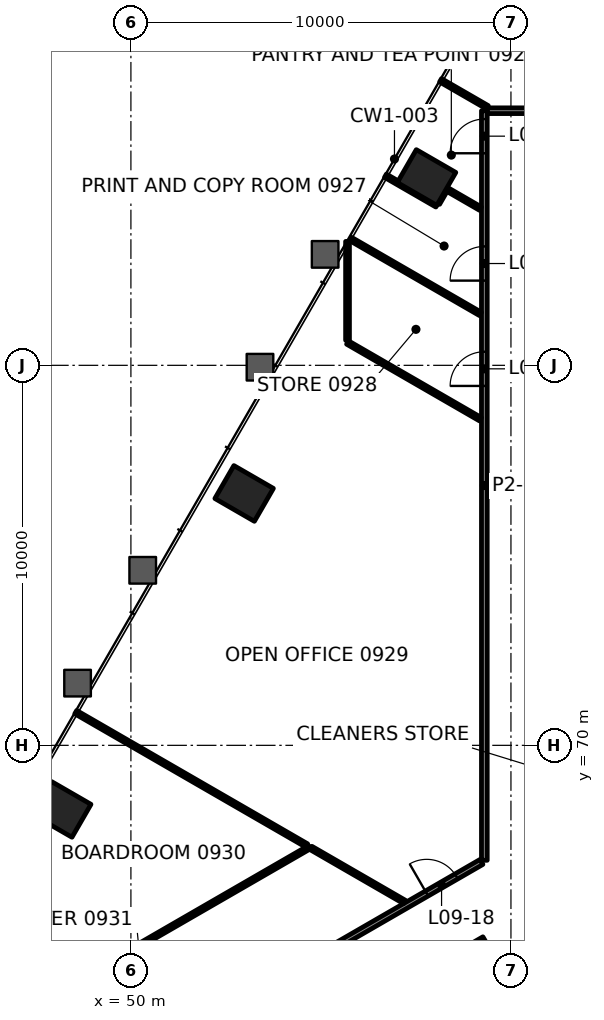
"""IFC4 building model, lengths in metres.
Left out: names, types, materials, properties, quantities, classifications, styles, units other than length and angle.
Written with IfcOpenShell. Run it as: python <this file> out.ifc"""

import sys

from ifc_helpers import new_model, si_unit, direction, frame, frame_2d, origin, origin_2d, place, context, subcontext, project, spatial, rectangle, extrude, element, fill, save


model = new_model("IFC4")
c1 = context("Model", 3, precision=1e-05, world=origin(), true_north=direction((0.0, 1.0)))
c2 = subcontext(c1, "Body", "Model", "MODEL_VIEW")
j1 = project(units=[si_unit("LENGTHUNIT", "METRE"), si_unit("PLANEANGLEUNIT", "RADIAN")], contexts=[c1])
p1 = place(None, origin())
s1 = spatial("IfcSite", under=j1, at=p1, CompositionType="ELEMENT")
p2 = place(p1, origin())
s2 = spatial("IfcBuilding", under=s1, at=p2, CompositionType="ELEMENT")
p3 = place(p2, frame((0.0, 0.0, 44.2)))
s3 = spatial("IfcBuildingStorey", under=s2, at=p3, CompositionType="ELEMENT", Elevation=44.2)
for number, where, z_axis, x_axis in (
    (1, (57.78, 84.942, -0.0), (0.0, 0.0, 1.0), (-0.5, -0.866, 0.0)),
    (2, (52.979, 76.628, -0.0), (0.0, 0.0, 1.0), (-0.5, -0.866, 0.0)),
    (3, (48.179, 68.315, -0.0), (0.0, 0.0, 1.0), (-0.5, -0.866, 0.0)),
):
    element("IfcColumn", number, at=place(p3, frame(where, z_axis=z_axis, x_axis=x_axis)), inside=s3, PredefinedType="COLUMN", context=c2, shape_type="SweptSolid", body=[
        extrude(rectangle(XDim=1.0, YDim=1.2, at=origin_2d()), origin(), (0.0, 0.0, 1.0), 4.2),
    ])
p4 = place(p3, frame((59.375, 86.7, 0.0), z_axis=(0.0, 0.0, 1.0), x_axis=(1.0, 0.0, 0.0)))
e4 = element("IfcWall", 4, at=p4, inside=s3, PredefinedType="PARTITIONING", context=c2, shape_type="SweptSolid", body=[
    extrude(rectangle(XDim=9.649, YDim=0.15, at=frame_2d((4.825, 0.0))), origin(), (0.0, 0.0, 1.0), 3.4),
])
p5 = place(p4, frame((4.375, 0.0, 0.0)))
e5 = element("IfcOpeningElement", 5, at=p5, cuts=e4, PredefinedType="OPENING", context=c2, shape_type="SweptSolid", body=[
    extrude(rectangle(XDim=0.9, YDim=2.1, at=frame_2d((0.45, 1.05))), frame((0.0, 0.085, 0.0), z_axis=(0.0, -1.0, 0.0), x_axis=(1.0, 0.0, 0.0)), (0.0, 0.0, 1.0), 0.17),
])
p6 = place(p3, frame((59.3, 64.896, 0.0), z_axis=(0.0, 0.0, 1.0), x_axis=(-0.866022774611, -0.500004553834, 0.0)))
e6 = element("IfcWall", 6, at=p6, inside=s3, PredefinedType="PARTITIONING", context=c2, shape_type="SweptSolid", body=[
    extrude(rectangle(XDim=13.185, YDim=0.15, at=frame_2d((6.593, 0.0))), origin(), (0.0, 0.0, 1.0), 3.247),
])
p7 = place(p6, frame((6.676, 0.0, 0.0)))
e7 = element("IfcOpeningElement", 7, at=p7, cuts=e6, PredefinedType="OPENING", context=c2, shape_type="SweptSolid", body=[
    extrude(rectangle(XDim=0.9, YDim=2.1, at=frame_2d((0.45, 1.05))), frame((0.0, 0.085, 0.0), z_axis=(0.0, -1.0, 0.0), x_axis=(1.0, 0.0, 0.0)), (0.0, 0.0, 1.0), 0.17),
])
p8 = place(p3, frame((46.981, 59.863, 0.0), z_axis=(0.0, 0.0, 1.0), x_axis=(0.866023110832, 0.500003971489, 0.0)))
e8 = element("IfcWall", 8, at=p8, inside=s3, PredefinedType="PARTITIONING", context=c2, shape_type="SweptSolid", body=[
    extrude(rectangle(XDim=14.138, YDim=0.15, at=frame_2d((7.069, 0.0))), origin(), (0.0, 0.0, 1.0), 3.4),
])
p9 = place(p8, frame((5.559, 0.0, 0.0)))
e9 = element("IfcOpeningElement", 9, at=p9, cuts=e8, PredefinedType="OPENING", context=c2, shape_type="SweptSolid", body=[
    extrude(rectangle(XDim=1.0, YDim=2.1, at=frame_2d((0.5, 1.05))), frame((0.0, 0.085, 0.0), z_axis=(0.0, -1.0, 0.0), x_axis=(1.0, 0.0, 0.0)), (0.0, 0.0, 1.0), 0.17),
])
p10 = place(p8, frame((12.475, 0.0, 0.0)))
e10 = element("IfcOpeningElement", 10, at=p10, cuts=e8, PredefinedType="OPENING", context=c2, shape_type="SweptSolid", body=[
    extrude(rectangle(XDim=0.9, YDim=2.1, at=frame_2d((0.45, 1.05))), frame((0.0, 0.085, 0.0), z_axis=(0.0, -1.0, 0.0), x_axis=(1.0, 0.0, 0.0)), (0.0, 0.0, 1.0), 0.17),
])
p11 = place(p3, frame((54.7, 67.321, 0.0), z_axis=(0.0, 0.0, 1.0), x_axis=(-0.866023761488, -0.500002844531, 0.0)))
e11 = element("IfcWall", 11, at=p11, inside=s3, PredefinedType="PARTITIONING", context=c2, shape_type="SweptSolid", body=[
    extrude(rectangle(XDim=13.014, YDim=0.1, at=frame_2d((6.507, 0.0))), origin(), (0.0, 0.0, 1.0), 3.4),
])
p12 = place(p11, frame((5.907, 0.0, 0.0)))
e12 = element("IfcOpeningElement", 12, at=p12, cuts=e11, PredefinedType="OPENING", context=c2, shape_type="SweptSolid", body=[
    extrude(rectangle(XDim=1.2, YDim=2.1, at=frame_2d((0.6, 1.05))), frame((0.0, 0.06, 0.0), z_axis=(0.0, -1.0, 0.0), x_axis=(1.0, 0.0, 0.0)), (0.0, 0.0, 1.0), 0.12),
])
p13 = place(p3, frame((58.079, 84.261, 0.0), z_axis=(0.0, 0.0, 1.0), x_axis=(0.499776670437, 0.866154304779, 0.0)))
e13 = element("IfcWall", 13, at=p13, inside=s3, PredefinedType="PARTITIONING", context=c2, shape_type="SweptSolid", body=[
    extrude(rectangle(XDim=0.39, YDim=0.1, at=frame_2d((0.195, 0.0))), origin(), (0.0, 0.0, 1.0), 3.4),
])
p14 = place(p3, frame((59.3, 66.975, 0.0), z_axis=(0.0, 0.0, 1.0), x_axis=(0.0, 1.0, 0.0)))
e14 = element("IfcWall", 14, at=p14, inside=s3, PredefinedType="PARTITIONING", context=c2, shape_type="SweptSolid", body=[
    extrude(rectangle(XDim=19.725, YDim=0.15, at=frame_2d((9.862, 0.0))), origin(), (0.0, 0.0, 1.0), 3.4),
])
p15 = place(p14, frame((12.483, 0.0, 0.0)))
e15 = element("IfcOpeningElement", 15, at=p15, cuts=e14, PredefinedType="OPENING", context=c2, shape_type="SweptSolid", body=[
    extrude(rectangle(XDim=0.9, YDim=2.1, at=frame_2d((0.45, 1.05))), frame((0.0, 0.085, 0.0), z_axis=(0.0, -1.0, 0.0), x_axis=(1.0, 0.0, 0.0)), (0.0, 0.0, 1.0), 0.17),
])
p16 = place(p14, frame((15.254, 0.0, 0.0)))
e16 = element("IfcOpeningElement", 16, at=p16, cuts=e14, PredefinedType="OPENING", context=c2, shape_type="SweptSolid", body=[
    extrude(rectangle(XDim=0.9, YDim=2.1, at=frame_2d((0.45, 1.05))), frame((0.0, 0.085, 0.0), z_axis=(0.0, -1.0, 0.0), x_axis=(1.0, 0.0, 0.0)), (0.0, 0.0, 1.0), 0.17),
])
p17 = place(p14, frame((18.606, 0.0, 0.0)))
e17 = element("IfcOpeningElement", 17, at=p17, cuts=e14, PredefinedType="OPENING", context=c2, shape_type="SweptSolid", body=[
    extrude(rectangle(XDim=0.9, YDim=2.1, at=frame_2d((0.45, 1.05))), frame((0.0, 0.085, 0.0), z_axis=(0.0, -1.0, 0.0), x_axis=(1.0, 0.0, 0.0)), (0.0, 0.0, 1.0), 0.17),
])
p18 = place(p3, frame((55.7, 80.659, 0.0), z_axis=(0.0, 0.0, 1.0), x_axis=(0.0, 1.0, 0.0)))
e18 = element("IfcWall", 18, at=p18, inside=s3, PredefinedType="PARTITIONING", context=c2, shape_type="SweptSolid", body=[
    extrude(rectangle(XDim=2.602, YDim=0.1, at=frame_2d((1.301, 0.0))), origin(), (0.0, 0.0, 1.0), 3.165),
])
p19 = place(p3, frame((59.379, 86.79, 0.0), z_axis=(0.0, 0.0, 1.0), x_axis=(-0.866025408043, 0.499999992624, 0.0)))
e19 = element("IfcWall", 19, at=p19, inside=s3, PredefinedType="PARTITIONING", context=c2, shape_type="SweptSolid", body=[
    extrude(rectangle(XDim=1.421, YDim=0.1, at=frame_2d((0.711, 0.0))), origin(), (0.0, 0.0, 1.0), 3.165),
])
p20 = place(p3, frame((59.199, 84.123, 0.0), z_axis=(0.0, 0.0, 1.0), x_axis=(-0.866036909293, 0.499980071345, 0.0)))
e20 = element("IfcWall", 20, at=p20, inside=s3, PredefinedType="PARTITIONING", context=c2, shape_type="SweptSolid", body=[
    extrude(rectangle(XDim=1.039, YDim=0.1, at=frame_2d((0.52, 0.0))), origin(), (0.0, 0.0, 1.0), 3.4),
])
p21 = place(p3, frame((58.049, 84.209, 0.0), z_axis=(0.0, 0.0, 1.0), x_axis=(-0.866096984875, 0.499875997414, 0.0)))
e21 = element("IfcWall", 21, at=p21, inside=s3, PredefinedType="PARTITIONING", context=c2, shape_type="SweptSolid", body=[
    extrude(rectangle(XDim=1.56, YDim=0.1, at=frame_2d((0.78, 0.0))), origin(), (0.0, 0.0, 1.0), 3.165),
])
p22 = place(p3, frame((59.199, 81.352, 0.0), z_axis=(0.0, 0.0, 1.0), x_axis=(-0.866013418812, 0.500020758006, 0.0)))
e22 = element("IfcWall", 22, at=p22, inside=s3, PredefinedType="PARTITIONING", context=c2, shape_type="SweptSolid", body=[
    extrude(rectangle(XDim=3.944, YDim=0.1, at=frame_2d((1.972, 0.0))), origin(), (0.0, 0.0, 1.0), 3.165),
])
p23 = place(p3, frame((59.199, 78.58, 0.0), z_axis=(0.0, 0.0, 1.0), x_axis=(-0.866025579307, 0.499999695987, 0.0)))
e23 = element("IfcWall", 23, at=p23, inside=s3, PredefinedType="PARTITIONING", context=c2, shape_type="SweptSolid", body=[
    extrude(rectangle(XDim=4.04, YDim=0.1, at=frame_2d((2.02, 0.0))), origin(), (0.0, 0.0, 1.0), 3.4),
])
p24 = place(p3, frame((57.199, 65.878, 0.0), z_axis=(0.0, 0.0, 1.0), x_axis=(-0.865982457891, 0.500074377092, 0.0)))
e24 = element("IfcWall", 24, at=p24, inside=s3, PredefinedType="PARTITIONING", context=c2, shape_type="SweptSolid", body=[
    extrude(rectangle(XDim=2.842, YDim=0.1, at=frame_2d((1.421, 0.0))), origin(), (0.0, 0.0, 1.0), 3.4),
])
p25 = place(p3, frame((54.625, 67.365, 0.0), z_axis=(0.0, 0.0, 1.0), x_axis=(-0.866037841179, 0.499978457183, 0.0)))
e25 = element("IfcWall", 25, at=p25, inside=s3, PredefinedType="PARTITIONING", context=c2, shape_type="SweptSolid", body=[
    extrude(rectangle(XDim=7.017, YDim=0.1, at=frame_2d((3.508, 0.0))), origin(), (0.0, 0.0, 1.0), 3.165),
])
p26 = place(p10, origin())
e26 = element("IfcDoor", 26, at=p26, inside=s3, OperationType="SINGLE_SWING_RIGHT", PredefinedType="DOOR", context=c2, shape_type="SweptSolid", body=[
    extrude(rectangle(XDim=0.9, YDim=2.1, at=frame_2d((0.45, 1.05))), frame((0.0, 0.025, 0.0), z_axis=(0.0, -1.0, 0.0), x_axis=(1.0, 0.0, 0.0)), (0.0, 0.0, 1.0), 0.05),
])
fill(e10, e26)
p27 = place(p15, origin())
e27 = element("IfcDoor", 27, at=p27, inside=s3, OperationType="SINGLE_SWING_LEFT", PredefinedType="DOOR", context=c2, shape_type="SweptSolid", body=[
    extrude(rectangle(XDim=0.9, YDim=2.1, at=frame_2d((0.45, 1.05))), frame((0.0, 0.025, 0.0), z_axis=(0.0, -1.0, 0.0), x_axis=(1.0, 0.0, 0.0)), (0.0, 0.0, 1.0), 0.05),
])
fill(e15, e27)
p28 = place(p16, origin())
e28 = element("IfcDoor", 28, at=p28, inside=s3, OperationType="SINGLE_SWING_RIGHT", PredefinedType="DOOR", context=c2, shape_type="SweptSolid", body=[
    extrude(rectangle(XDim=0.9, YDim=2.1, at=frame_2d((0.45, 1.05))), frame((0.0, 0.025, 0.0), z_axis=(0.0, -1.0, 0.0), x_axis=(1.0, 0.0, 0.0)), (0.0, 0.0, 1.0), 0.05),
])
fill(e16, e28)
p29 = place(p17, origin())
e29 = element("IfcDoor", 29, at=p29, inside=s3, OperationType="SINGLE_SWING_LEFT", PredefinedType="DOOR", context=c2, shape_type="SweptSolid", body=[
    extrude(rectangle(XDim=0.9, YDim=2.1, at=frame_2d((0.45, 1.05))), frame((0.0, 0.025, 0.0), z_axis=(0.0, -1.0, 0.0), x_axis=(1.0, 0.0, 0.0)), (0.0, 0.0, 1.0), 0.05),
])
fill(e17, e29)
save(model, sys.argv[1])
